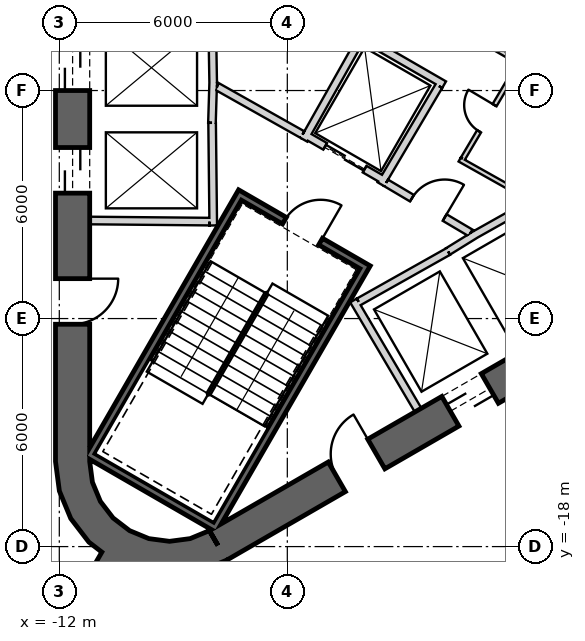
"""IFC4 building model, lengths in metres.
Left out: names, types, materials, properties, quantities, classifications, styles, units other than length and angle.
Written with IfcOpenShell. Run it as: python <this file> out.ifc"""

import sys

from ifc_helpers import new_model, si_unit, direction, frame, frame_2d, origin, place, context, subcontext, project, spatial, polyline, rectangle, outline, extrude, element, fill, save


model = new_model("IFC4")
c1 = context("Model", 3, precision=1e-05, world=origin(), true_north=direction((0.0, 1.0)))
c2 = subcontext(c1, "Body", "Model", "MODEL_VIEW")
j1 = project(units=[si_unit("LENGTHUNIT", "METRE"), si_unit("PLANEANGLEUNIT", "RADIAN")], contexts=[c1])
p1 = place(None, origin())
s1 = spatial("IfcSite", under=j1, at=p1, CompositionType="ELEMENT")
p2 = place(p1, origin())
s2 = spatial("IfcBuilding", under=s1, at=p2, CompositionType="ELEMENT")
p3 = place(p2, frame((0.0, 0.0, 205.2)))
s3 = spatial("IfcBuildingStorey", under=s2, at=p3, CompositionType="ELEMENT", Elevation=205.2)
p4 = place(p3, frame((-11.65, 15.762, 0.0), z_axis=(0.0, 0.0, 1.0), x_axis=(0.0, -1.0, 0.0)))
e1 = element("IfcWall", 1, at=p4, inside=s3, PredefinedType="SHEAR", context=c2, shape_type="SweptSolid", body=[
    extrude(rectangle(XDim=31.523, YDim=0.9, at=frame_2d((15.762, 0.0))), origin(), (0.0, 0.0, 1.0), 4.0),
])
p5 = place(p4, frame((7.062, 0.0, 0.0)))
e2 = element("IfcOpeningElement", 2, at=p5, cuts=e1, PredefinedType="OPENING", context=c2, shape_type="SweptSolid", body=[
    extrude(rectangle(XDim=1.2, YDim=2.4, at=frame_2d((0.6, 1.2))), frame((0.0, 0.46, 0.0), z_axis=(0.0, -1.0, 0.0), x_axis=(1.0, 0.0, 0.0)), (0.0, 0.0, 1.0), 0.92),
])
p6 = place(p4, frame((9.762, 0.0, 0.0)))
e3 = element("IfcOpeningElement", 3, at=p6, cuts=e1, PredefinedType="OPENING", context=c2, shape_type="SweptSolid", body=[
    extrude(rectangle(XDim=1.2, YDim=2.4, at=frame_2d((0.6, 1.2))), frame((0.0, 0.46, 0.0), z_axis=(0.0, -1.0, 0.0), x_axis=(1.0, 0.0, 0.0)), (0.0, 0.0, 1.0), 0.92),
])
p7 = place(p4, frame((12.462, 0.0, 0.0)))
e4 = element("IfcOpeningElement", 4, at=p7, cuts=e1, PredefinedType="OPENING", context=c2, shape_type="SweptSolid", body=[
    extrude(rectangle(XDim=1.2, YDim=2.4, at=frame_2d((0.6, 1.2))), frame((0.0, 0.46, 0.0), z_axis=(0.0, -1.0, 0.0), x_axis=(1.0, 0.0, 0.0)), (0.0, 0.0, 1.0), 0.92),
])
p8 = place(p4, frame((15.162, 0.0, 0.0)))
e5 = element("IfcOpeningElement", 5, at=p8, cuts=e1, PredefinedType="OPENING", context=c2, shape_type="SweptSolid", body=[
    extrude(rectangle(XDim=1.2, YDim=2.4, at=frame_2d((0.6, 1.2))), frame((0.0, 0.46, 0.0), z_axis=(0.0, -1.0, 0.0), x_axis=(1.0, 0.0, 0.0)), (0.0, 0.0, 1.0), 0.92),
])
p9 = place(p4, frame((17.862, 0.0, 0.0)))
e6 = element("IfcOpeningElement", 6, at=p9, cuts=e1, PredefinedType="OPENING", context=c2, shape_type="SweptSolid", body=[
    extrude(rectangle(XDim=1.2, YDim=2.4, at=frame_2d((0.6, 1.2))), frame((0.0, 0.46, 0.0), z_axis=(0.0, -1.0, 0.0), x_axis=(1.0, 0.0, 0.0)), (0.0, 0.0, 1.0), 0.92),
])
p10 = place(p4, frame((20.562, 0.0, 0.0)))
e7 = element("IfcOpeningElement", 7, at=p10, cuts=e1, PredefinedType="OPENING", context=c2, shape_type="SweptSolid", body=[
    extrude(rectangle(XDim=1.2, YDim=2.4, at=frame_2d((0.6, 1.2))), frame((0.0, 0.46, 0.0), z_axis=(0.0, -1.0, 0.0), x_axis=(1.0, 0.0, 0.0)), (0.0, 0.0, 1.0), 0.92),
])
p11 = place(p4, frame((23.262, 0.0, 0.0)))
e8 = element("IfcOpeningElement", 8, at=p11, cuts=e1, PredefinedType="OPENING", context=c2, shape_type="SweptSolid", body=[
    extrude(rectangle(XDim=1.2, YDim=2.4, at=frame_2d((0.6, 1.2))), frame((0.0, 0.46, 0.0), z_axis=(0.0, -1.0, 0.0), x_axis=(1.0, 0.0, 0.0)), (0.0, 0.0, 1.0), 0.92),
])
p12 = place(p4, frame((3.612, 0.0, 0.0)))
e9 = element("IfcOpeningElement", 9, at=p12, cuts=e1, PredefinedType="OPENING", context=c2, shape_type="SweptSolid", body=[
    extrude(rectangle(XDim=1.2, YDim=2.4, at=frame_2d((0.6, 1.2))), frame((0.0, 0.46, 0.0), z_axis=(0.0, -1.0, 0.0), x_axis=(1.0, 0.0, 0.0)), (0.0, 0.0, 1.0), 0.92),
])
p13 = place(p4, frame((26.712, 0.0, 0.0)))
e10 = element("IfcOpeningElement", 10, at=p13, cuts=e1, PredefinedType="OPENING", context=c2, shape_type="SweptSolid", body=[
    extrude(rectangle(XDim=1.2, YDim=2.4, at=frame_2d((0.6, 1.2))), frame((0.0, 0.46, 0.0), z_axis=(0.0, -1.0, 0.0), x_axis=(1.0, 0.0, 0.0)), (0.0, 0.0, 1.0), 0.92),
])
p14 = place(p3, frame((-7.825, -17.97, 0.0), z_axis=(0.0, 0.0, 1.0), x_axis=(0.866028369851, 0.499994862586, 0.0)))
e11 = element("IfcWall", 11, at=p14, inside=s3, PredefinedType="SHEAR", context=c2, shape_type="SweptSolid", body=[
    extrude(rectangle(XDim=31.523, YDim=0.9, at=frame_2d((15.762, 0.0))), origin(), (0.0, 0.0, 1.0), 4.0),
])
p15 = place(p14, frame((7.062, 0.0, 0.0)))
e12 = element("IfcOpeningElement", 12, at=p15, cuts=e11, PredefinedType="OPENING", context=c2, shape_type="SweptSolid", body=[
    extrude(rectangle(XDim=1.2, YDim=2.4, at=frame_2d((0.6, 1.2))), frame((0.0, 0.46, 0.0), z_axis=(0.0, -1.0, 0.0), x_axis=(1.0, 0.0, 0.0)), (0.0, 0.0, 1.0), 0.92),
])
p16 = place(p14, frame((9.762, 0.0, 0.0)))
e13 = element("IfcOpeningElement", 13, at=p16, cuts=e11, PredefinedType="OPENING", context=c2, shape_type="SweptSolid", body=[
    extrude(rectangle(XDim=1.2, YDim=2.4, at=frame_2d((0.6, 1.2))), frame((0.0, 0.46, 0.0), z_axis=(0.0, -1.0, 0.0), x_axis=(1.0, 0.0, 0.0)), (0.0, 0.0, 1.0), 0.92),
])
p17 = place(p14, frame((12.462, 0.0, 0.0)))
e14 = element("IfcOpeningElement", 14, at=p17, cuts=e11, PredefinedType="OPENING", context=c2, shape_type="SweptSolid", body=[
    extrude(rectangle(XDim=1.2, YDim=2.4, at=frame_2d((0.6, 1.2))), frame((0.0, 0.46, 0.0), z_axis=(0.0, -1.0, 0.0), x_axis=(1.0, 0.0, 0.0)), (0.0, 0.0, 1.0), 0.92),
])
p18 = place(p14, frame((15.162, 0.0, 0.0)))
e15 = element("IfcOpeningElement", 15, at=p18, cuts=e11, PredefinedType="OPENING", context=c2, shape_type="SweptSolid", body=[
    extrude(rectangle(XDim=1.2, YDim=2.4, at=frame_2d((0.6, 1.2))), frame((0.0, 0.46, 0.0), z_axis=(0.0, -1.0, 0.0), x_axis=(1.0, 0.0, 0.0)), (0.0, 0.0, 1.0), 0.92),
])
p19 = place(p14, frame((17.862, 0.0, 0.0)))
e16 = element("IfcOpeningElement", 16, at=p19, cuts=e11, PredefinedType="OPENING", context=c2, shape_type="SweptSolid", body=[
    extrude(rectangle(XDim=1.2, YDim=2.4, at=frame_2d((0.6, 1.2))), frame((0.0, 0.46, 0.0), z_axis=(0.0, -1.0, 0.0), x_axis=(1.0, 0.0, 0.0)), (0.0, 0.0, 1.0), 0.92),
])
p20 = place(p14, frame((20.562, 0.0, 0.0)))
e17 = element("IfcOpeningElement", 17, at=p20, cuts=e11, PredefinedType="OPENING", context=c2, shape_type="SweptSolid", body=[
    extrude(rectangle(XDim=1.2, YDim=2.4, at=frame_2d((0.6, 1.2))), frame((0.0, 0.46, 0.0), z_axis=(0.0, -1.0, 0.0), x_axis=(1.0, 0.0, 0.0)), (0.0, 0.0, 1.0), 0.92),
])
p21 = place(p14, frame((26.712, 0.0, 0.0)))
e18 = element("IfcOpeningElement", 18, at=p21, cuts=e11, PredefinedType="OPENING", context=c2, shape_type="SweptSolid", body=[
    extrude(rectangle(XDim=1.2, YDim=2.4, at=frame_2d((0.6, 1.2))), frame((0.0, 0.46, 0.0), z_axis=(0.0, -1.0, 0.0), x_axis=(1.0, 0.0, 0.0)), (0.0, 0.0, 1.0), 0.92),
])
p22 = place(p14, frame((3.612, 0.0, 0.0)))
e19 = element("IfcOpeningElement", 19, at=p22, cuts=e11, PredefinedType="OPENING", context=c2, shape_type="SweptSolid", body=[
    extrude(rectangle(XDim=1.2, YDim=2.4, at=frame_2d((0.6, 1.2))), frame((0.0, 0.46, 0.0), z_axis=(0.0, -1.0, 0.0), x_axis=(1.0, 0.0, 0.0)), (0.0, 0.0, 1.0), 0.92),
])
p23 = place(p3, origin())
e20 = element("IfcWall", 20, at=p23, inside=s3, PredefinedType="SHEAR", context=c2, shape_type="SweptSolid", body=[
    extrude(outline(polyline([(-12.1, -15.762), (-11.998, -16.538), (-11.698, -17.262), (-11.221, -17.883), (-10.6, -18.36), (-9.876, -18.659), (-9.1, -18.762), (-8.323, -18.659), (-7.6, -18.36), (-8.05, -17.58), (-8.556, -17.79), (-9.1, -17.862), (-9.644, -17.79), (-10.15, -17.58), (-10.585, -17.247), (-10.919, -16.812), (-11.128, -16.305), (-11.2, -15.762), (-12.1, -15.762)])), origin(), (0.0, 0.0, 1.0), 4.0),
])
p24 = place(p3, frame((-10.575, -18.316, 0.0), z_axis=(0.0, 0.0, 1.0), x_axis=(-0.499999598486, -0.866025635599, 0.0)))
e21 = element("IfcWall", 21, at=p24, inside=s3, PredefinedType="SHEAR", context=c2, shape_type="SweptSolid", body=[
    extrude(rectangle(XDim=11.794, YDim=0.7, at=frame_2d((5.897, 0.0))), origin(), (0.0, 0.0, 1.0), 4.0),
])
p25 = place(p3, frame((-7.95, -5.772, 0.0), z_axis=(0.0, 0.0, 1.0), x_axis=(-0.030803413295, -0.999525462272, 0.0)))
e22 = element("IfcWall", 22, at=p25, inside=s3, PredefinedType="PLUMBINGWALL", context=c2, shape_type="SweptSolid", body=[
    extrude(rectangle(XDim=1.078, YDim=0.2, at=frame_2d((0.539, 0.0))), origin(), (0.0, 0.0, 1.0), 3.7),
])
p26 = place(p3, frame((-7.98, -4.05, 0.0), z_axis=(0.0, 0.0, 1.0), x_axis=(0.016809909365, -0.999858703491, 0.0)))
e23 = element("IfcWall", 23, at=p26, inside=s3, PredefinedType="PLUMBINGWALL", context=c2, shape_type="SweptSolid", body=[
    extrude(rectangle(XDim=1.844, YDim=0.2, at=frame_2d((0.922, 0.0))), origin(), (0.0, 0.0, 1.0), 3.7),
])
p27 = place(p3, frame((-7.979, -6.85, 0.0), z_axis=(0.0, 0.0, 1.0), x_axis=(0.011121475088, -0.999938154483, 0.0)))
e24 = element("IfcWall", 24, at=p27, inside=s3, PredefinedType="PLUMBINGWALL", context=c2, shape_type="SweptSolid", body=[
    extrude(rectangle(XDim=2.7, YDim=0.2, at=frame_2d((1.35, 0.0))), origin(), (0.0, 0.0, 1.0), 3.7),
])
p28 = place(p3, frame((-8.05, -9.449, 0.0), z_axis=(0.0, 0.0, 1.0), x_axis=(-0.999957467379, 0.009222983926, 0.0)))
e25 = element("IfcWall", 25, at=p28, inside=s3, PredefinedType="PLUMBINGWALL", context=c2, shape_type="SweptSolid", body=[
    extrude(rectangle(XDim=3.15, YDim=0.2, at=frame_2d((1.575, 0.0))), origin(), (0.0, 0.0, 1.0), 3.7),
])
p29 = place(p3, frame((-2.558, -14.409, 0.0), z_axis=(0.0, 0.0, 1.0), x_axis=(-0.507997497166, 0.861358544901, 0.0)))
e26 = element("IfcWall", 26, at=p29, inside=s3, PredefinedType="PLUMBINGWALL", context=c2, shape_type="SweptSolid", body=[
    extrude(rectangle(XDim=3.35, YDim=0.2, at=frame_2d((1.675, 0.0))), origin(), (0.0, 0.0, 1.0), 3.7),
])
p30 = place(p3, frame((-1.769, -10.237, 0.0), z_axis=(0.0, 0.0, 1.0), x_axis=(-0.871534483978, -0.490334215854, 0.0)))
e27 = element("IfcWall", 27, at=p30, inside=s3, PredefinedType="PLUMBINGWALL", context=c2, shape_type="SweptSolid", body=[
    extrude(rectangle(XDim=2.7, YDim=0.2, at=frame_2d((1.35, 0.0))), origin(), (0.0, 0.0, 1.0), 3.7),
])
p31 = place(p3, frame((-1.024, -9.771, 0.0), z_axis=(0.0, 0.0, 1.0), x_axis=(-0.850348075135, -0.526220629693, 0.0)))
e28 = element("IfcWall", 28, at=p31, inside=s3, PredefinedType="PLUMBINGWALL", context=c2, shape_type="SweptSolid", body=[
    extrude(rectangle(XDim=0.878, YDim=0.2, at=frame_2d((0.439, 0.0))), origin(), (0.0, 0.0, 1.0), 3.7),
])
p32 = place(p3, frame((-1.13, -9.832, 0.0), z_axis=(0.0, 0.0, 1.0), x_axis=(0.871988740738, 0.489525929882, 0.0)))
e29 = element("IfcWall", 29, at=p32, inside=s3, PredefinedType="PLUMBINGWALL", context=c2, shape_type="SweptSolid", body=[
    extrude(rectangle(XDim=1.845, YDim=0.2, at=frame_2d((0.922, 0.0))), origin(), (0.0, 0.0, 1.0), 3.7),
])
p33 = place(p3, frame((-3.905, -10.563, -0.3), z_axis=(0.0, 0.0, 1.0), x_axis=(-0.500012932018, -0.866017937352, 0.0)))
e30 = element("IfcWall", 30, at=p33, inside=s3, PredefinedType="SHEAR", context=c2, shape_type="SweptSolid", body=[
    extrude(rectangle(XDim=8.1, YDim=0.2, at=frame_2d((4.05, 0.0))), origin(), (0.0, 0.0, 1.0), 4.0),
])
p34 = place(p3, frame((-11.282, -15.541, -0.3), z_axis=(0.0, 0.0, 1.0), x_axis=(0.866000483506, -0.500043160704, 0.0)))
e31 = element("IfcWall", 31, at=p34, inside=s3, PredefinedType="SHEAR", context=c2, shape_type="SweptSolid", body=[
    extrude(rectangle(XDim=3.8, YDim=0.2, at=frame_2d((1.9, 0.0))), origin(), (0.0, 0.0, 1.0), 4.0),
])
p35 = place(p3, frame((-7.196, -8.663, -0.3), z_axis=(0.0, 0.0, 1.0), x_axis=(-0.499997992926, -0.866026562566, 0.0)))
e32 = element("IfcWall", 32, at=p35, inside=s3, PredefinedType="SHEAR", context=c2, shape_type="SweptSolid", body=[
    extrude(rectangle(XDim=7.9, YDim=0.2, at=frame_2d((3.95, 0.0))), origin(), (0.0, 0.0, 1.0), 4.0),
])
p36 = place(p3, frame((-4.041, -10.599, -0.3), z_axis=(0.0, 0.0, 1.0), x_axis=(-0.866047807691, 0.499961193289, 0.0)))
e33 = element("IfcWall", 33, at=p36, inside=s3, PredefinedType="SHEAR", context=c2, shape_type="SweptSolid", body=[
    extrude(rectangle(XDim=3.6, YDim=0.2, at=frame_2d((1.8, 0.0))), origin(), (0.0, 0.0, 1.0), 4.0),
])
p37 = place(p36, frame((1.25, 0.0, 0.3)))
e34 = element("IfcOpeningElement", 34, at=p37, cuts=e33, PredefinedType="OPENING", context=c2, shape_type="SweptSolid", body=[
    extrude(rectangle(XDim=1.1, YDim=2.1, at=frame_2d((0.55, 1.05))), frame((0.0, 0.11, 0.0), z_axis=(0.0, -1.0, 0.0), x_axis=(1.0, 0.0, 0.0)), (0.0, 0.0, 1.0), 0.22),
])
p38 = place(p3, frame((-3.446, -8.368, 0.0), z_axis=(0.0, 0.0, 1.0), x_axis=(-0.866024647952, 0.500001309137, 0.0)))
e35 = element("IfcWall", 35, at=p38, inside=s3, PredefinedType="PLUMBINGWALL", context=c2, shape_type="SweptSolid", body=[
    extrude(rectangle(XDim=2.4, YDim=0.2, at=frame_2d((1.2, 0.0))), origin(), (0.0, 0.0, 1.0), 3.7),
])
p39 = place(p38, frame((0.6, 0.0, 0.0)))
e36 = element("IfcOpeningElement", 36, at=p39, cuts=e35, PredefinedType="OPENING", context=c2, shape_type="SweptSolid", body=[
    extrude(rectangle(XDim=1.2, YDim=2.4, at=frame_2d((0.6, 1.2))), frame((0.0, 0.11, 0.0), z_axis=(0.0, -1.0, 0.0), x_axis=(1.0, 0.0, 0.0)), (0.0, 0.0, 1.0), 0.22),
])
p40 = place(p3, frame((-5.562, -7.296, 0.0), z_axis=(0.0, 0.0, 1.0), x_axis=(0.491322718731, 0.870977603649, 0.0)))
e37 = element("IfcWall", 37, at=p40, inside=s3, PredefinedType="PLUMBINGWALL", context=c2, shape_type="SweptSolid", body=[
    extrude(rectangle(XDim=3.1, YDim=0.2, at=frame_2d((1.55, 0.0))), origin(), (0.0, 0.0, 1.0), 3.7),
])
p41 = place(p3, frame((-3.957, -4.644, 0.0), z_axis=(0.0, 0.0, 1.0), x_axis=(0.865991127953, -0.500059362782, 0.0)))
e38 = element("IfcWall", 38, at=p41, inside=s3, PredefinedType="PLUMBINGWALL", context=c2, shape_type="SweptSolid", body=[
    extrude(rectangle(XDim=2.405, YDim=0.2, at=frame_2d((1.202, 0.0))), origin(), (0.0, 0.0, 1.0), 3.7),
])
p42 = place(p3, frame((-2.012, -5.882, 0.0), z_axis=(0.0, 0.0, 1.0), x_axis=(-0.508619639323, -0.860991325447, 0.0)))
e39 = element("IfcWall", 39, at=p42, inside=s3, PredefinedType="PLUMBINGWALL", context=c2, shape_type="SweptSolid", body=[
    extrude(rectangle(XDim=3.0, YDim=0.2, at=frame_2d((1.5, 0.0))), origin(), (0.0, 0.0, 1.0), 3.7),
])
p43 = place(p3, frame((-7.849, -5.894, 0.0), z_axis=(0.0, 0.0, 1.0), x_axis=(0.871340486379, -0.490678873396, 0.0)))
e40 = element("IfcWall", 40, at=p43, inside=s3, PredefinedType="PARTITIONING", context=c2, shape_type="SweptSolid", body=[
    extrude(rectangle(XDim=2.581, YDim=0.2, at=frame_2d((1.291, 0.0))), origin(), (0.0, 0.0, 1.0), 3.7),
])
p44 = place(p3, frame((-3.401, -8.43, 0.0), z_axis=(0.0, 0.0, 1.0), x_axis=(0.860598681535, -0.509283721849, 0.0)))
e41 = element("IfcWall", 41, at=p44, inside=s3, PredefinedType="PARTITIONING", context=c2, shape_type="SweptSolid", body=[
    extrude(rectangle(XDim=2.581, YDim=0.2, at=frame_2d((1.291, 0.0))), origin(), (0.0, 0.0, 1.0), 3.7),
])
p45 = place(p44, frame((0.791, 0.0, 0.0)))
e42 = element("IfcOpeningElement", 42, at=p45, cuts=e41, PredefinedType="OPENING", context=c2, shape_type="SweptSolid", body=[
    extrude(rectangle(XDim=1.0, YDim=2.1, at=frame_2d((0.5, 1.05))), frame((0.0, 0.11, 0.0), z_axis=(0.0, -1.0, 0.0), x_axis=(1.0, 0.0, 0.0)), (0.0, 0.0, 1.0), 0.22),
])
p46 = place(p3, frame((-1.464, -7.816, 0.0), z_axis=(0.0, 0.0, 1.0), x_axis=(0.871880202732, -0.489719217597, 0.0)))
e43 = element("IfcWall", 43, at=p46, inside=s3, PredefinedType="PARTITIONING", context=c2, shape_type="SweptSolid", body=[
    extrude(rectangle(XDim=2.224, YDim=0.12, at=frame_2d((1.112, 0.0))), origin(), (0.0, 0.0, 1.0), 3.7),
])
p47 = place(p3, frame((-0.119, -5.664, 0.0), z_axis=(0.0, 0.0, 1.0), x_axis=(-0.509948384343, -0.860205001907, 0.0)))
e44 = element("IfcWall", 44, at=p47, inside=s3, PredefinedType="PARTITIONING", context=c2, shape_type="SweptSolid", body=[
    extrude(rectangle(XDim=2.475, YDim=0.12, at=frame_2d((1.238, 0.0))), origin(), (0.0, 0.0, 1.0), 3.7),
])
p48 = place(p47, frame((0.838, 0.0, 0.0)))
e45 = element("IfcOpeningElement", 45, at=p48, cuts=e44, PredefinedType="OPENING", context=c2, shape_type="SweptSolid", body=[
    extrude(rectangle(XDim=0.8, YDim=2.1, at=frame_2d((0.4, 1.05))), frame((0.0, 0.07, 0.0), z_axis=(0.0, -1.0, 0.0), x_axis=(1.0, 0.0, 0.0)), (0.0, 0.0, 1.0), 0.14),
])
p49 = place(p3, frame((-1.436, -4.367, 0.0), z_axis=(0.0, 0.0, 1.0), x_axis=(0.866087547558, -0.499892348375, 0.0)))
e46 = element("IfcWall", 46, at=p49, inside=s3, PredefinedType="PARTITIONING", context=c2, shape_type="SweptSolid", body=[
    extrude(rectangle(XDim=1.7, YDim=0.12, at=frame_2d((0.85, 0.0))), origin(), (0.0, 0.0, 1.0), 3.7),
])
p50 = place(p3, frame((-6.019, -23.22, 0.0), z_axis=(0.0, 0.0, 1.0), x_axis=(0.866022928472, 0.500004287342, 0.0)))
e47 = element("IfcWall", 47, at=p50, inside=s3, PredefinedType="PARTITIONING", context=c2, shape_type="SweptSolid", body=[
    extrude(rectangle(XDim=12.473, YDim=0.2, at=frame_2d((6.236, 0.0))), origin(), (0.0, 0.0, 1.0), 2.88),
])
p51 = place(p37, origin())
e48 = element("IfcDoor", 48, at=p51, inside=s3, OperationType="SINGLE_SWING_LEFT", PredefinedType="USERDEFINED", context=c2, shape_type="SweptSolid", body=[
    extrude(rectangle(XDim=1.1, YDim=2.1, at=frame_2d((0.55, 1.05))), frame((0.0, 0.025, 0.0), z_axis=(0.0, -1.0, 0.0), x_axis=(1.0, 0.0, 0.0)), (0.0, 0.0, 1.0), 0.05),
])
fill(e34, e48)
p52 = place(p45, origin())
e49 = element("IfcDoor", 49, at=p52, inside=s3, OperationType="SINGLE_SWING_LEFT", PredefinedType="USERDEFINED", context=c2, shape_type="SweptSolid", body=[
    extrude(rectangle(XDim=1.0, YDim=2.1, at=frame_2d((0.5, 1.05))), frame((0.0, 0.025, 0.0), z_axis=(0.0, -1.0, 0.0), x_axis=(1.0, 0.0, 0.0)), (0.0, 0.0, 1.0), 0.05),
])
fill(e42, e49)
p53 = place(p39, origin())
e50 = element("IfcDoor", 50, at=p53, inside=s3, OperationType="SLIDING_TO_LEFT", PredefinedType="USERDEFINED", context=c2, shape_type="SweptSolid", body=[
    extrude(rectangle(XDim=1.2, YDim=2.4, at=frame_2d((0.6, 1.2))), frame((0.0, 0.025, 0.0), z_axis=(0.0, -1.0, 0.0), x_axis=(1.0, 0.0, 0.0)), (0.0, 0.0, 1.0), 0.05),
])
fill(e36, e50)
p54 = place(p48, origin())
e51 = element("IfcDoor", 51, at=p54, inside=s3, OperationType="SINGLE_SWING_RIGHT", PredefinedType="USERDEFINED", context=c2, shape_type="SweptSolid", body=[
    extrude(rectangle(XDim=0.8, YDim=2.1, at=frame_2d((0.4, 1.05))), frame((0.0, 0.025, 0.0), z_axis=(0.0, -1.0, 0.0), x_axis=(1.0, 0.0, 0.0)), (0.0, 0.0, 1.0), 0.05),
])
fill(e45, e51)
p55 = place(p10, origin())
e52 = element("IfcDoor", 52, at=p55, inside=s3, OperationType="SLIDING_TO_LEFT", PredefinedType="USERDEFINED", context=c2, shape_type="SweptSolid", body=[
    extrude(rectangle(XDim=1.2, YDim=2.4, at=frame_2d((0.6, 1.2))), frame((0.0, 0.025, 0.0), z_axis=(0.0, -1.0, 0.0), x_axis=(1.0, 0.0, 0.0)), (0.0, 0.0, 1.0), 0.05),
])
fill(e7, e52)
p56 = place(p11, origin())
e53 = element("IfcDoor", 53, at=p56, inside=s3, OperationType="SLIDING_TO_LEFT", PredefinedType="USERDEFINED", context=c2, shape_type="SweptSolid", body=[
    extrude(rectangle(XDim=1.2, YDim=2.4, at=frame_2d((0.6, 1.2))), frame((0.0, 0.025, 0.0), z_axis=(0.0, -1.0, 0.0), x_axis=(1.0, 0.0, 0.0)), (0.0, 0.0, 1.0), 0.05),
])
fill(e8, e53)
p57 = place(p15, origin())
e54 = element("IfcDoor", 54, at=p57, inside=s3, OperationType="SLIDING_TO_LEFT", PredefinedType="USERDEFINED", context=c2, shape_type="SweptSolid", body=[
    extrude(rectangle(XDim=1.2, YDim=2.4, at=frame_2d((0.6, 1.2))), frame((0.0, 0.025, 0.0), z_axis=(0.0, -1.0, 0.0), x_axis=(1.0, 0.0, 0.0)), (0.0, 0.0, 1.0), 0.05),
])
fill(e12, e54)
p58 = place(p13, origin())
e55 = element("IfcDoor", 55, at=p58, inside=s3, OperationType="SINGLE_SWING_RIGHT", PredefinedType="USERDEFINED", context=c2, shape_type="SweptSolid", body=[
    extrude(rectangle(XDim=1.2, YDim=2.4, at=frame_2d((0.6, 1.2))), frame((0.0, 0.025, 0.0), z_axis=(0.0, -1.0, 0.0), x_axis=(1.0, 0.0, 0.0)), (0.0, 0.0, 1.0), 0.05),
])
fill(e10, e55)
p59 = place(p22, origin())
e56 = element("IfcDoor", 56, at=p59, inside=s3, OperationType="SINGLE_SWING_LEFT", PredefinedType="USERDEFINED", context=c2, shape_type="SweptSolid", body=[
    extrude(rectangle(XDim=1.2, YDim=2.4, at=frame_2d((0.6, 1.2))), frame((0.0, 0.025, 0.0), z_axis=(0.0, -1.0, 0.0), x_axis=(1.0, 0.0, 0.0)), (0.0, 0.0, 1.0), 0.05),
])
fill(e19, e56)
save(model, sys.argv[1])
